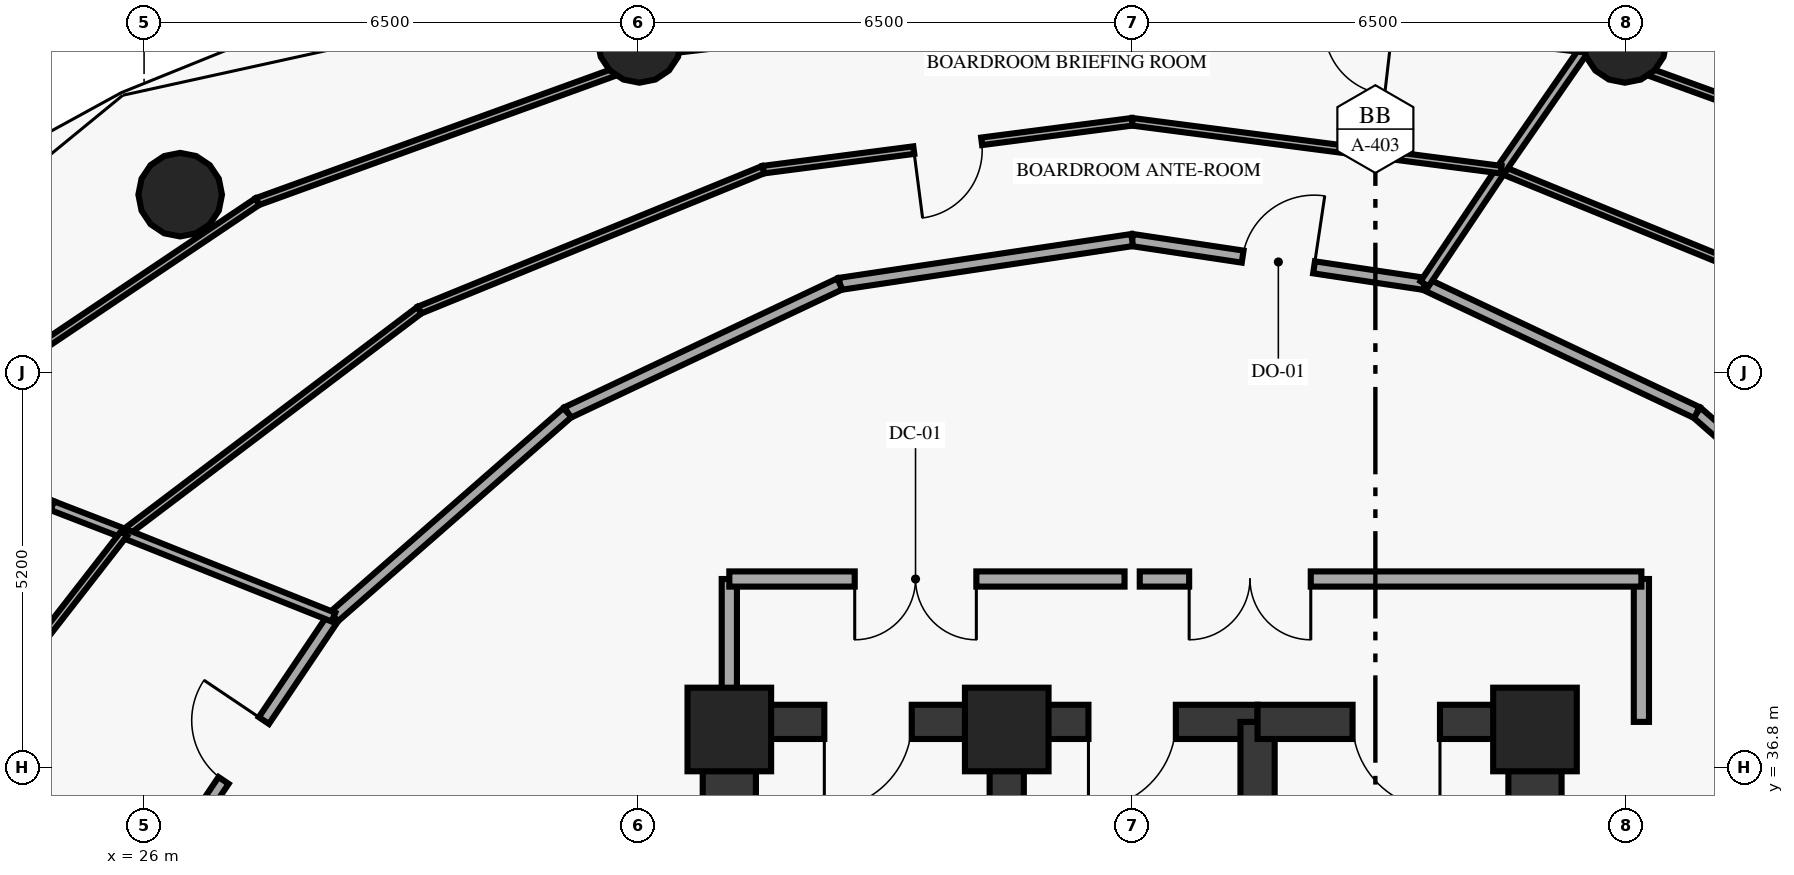
"""IFC4 building model, lengths in metres.
Left out: names, types, materials, properties, quantities, classifications, styles, units other than length and angle.
Written with IfcOpenShell. Run it as: python <this file> out.ifc"""

import sys

from ifc_helpers import new_model, si_unit, direction, frame, frame_2d, origin, origin_2d, place, context, subcontext, project, spatial, rectangle, circle, extrude, element, fill, save


model = new_model("IFC4")
c1 = context("Model", 3, precision=1e-05, world=origin(), true_north=direction((0.0, 1.0)))
c2 = subcontext(c1, "Body", "Model", "MODEL_VIEW")
j1 = project(units=[si_unit("LENGTHUNIT", "METRE"), si_unit("PLANEANGLEUNIT", "RADIAN")], contexts=[c1])
p1 = place(None, origin())
s1 = spatial("IfcSite", under=j1, at=p1, CompositionType="ELEMENT")
p2 = place(p1, origin())
s2 = spatial("IfcBuilding", under=s1, at=p2, CompositionType="ELEMENT")
p3 = place(p2, frame((0.0, 0.0, 102.0)))
s3 = spatial("IfcBuildingStorey", under=s2, at=p3, CompositionType="ELEMENT", Elevation=102.0)
for number, where, z_axis, x_axis in (
    (1, (44.3, 37.3, 0.0), (0.0, 0.0, 1.0), (1.0, 0.0, 0.0)),
    (2, (37.35, 37.3, 0.0), (0.0, 0.0, 1.0), (1.0, 0.0, 0.0)),
    (3, (33.7, 37.3, 0.0), (0.0, 0.0, 1.0), (1.0, 0.0, 0.0)),
):
    element("IfcColumn", number, at=place(p3, frame(where, z_axis=z_axis, x_axis=x_axis)), inside=s3, PredefinedType="PILASTER", context=c2, shape_type="SweptSolid", body=[
        extrude(rectangle(XDim=1.1, YDim=1.1, at=origin_2d()), origin(), (0.0, 0.0, 1.0), 3.7),
    ])
for number, where, z_axis, x_axis in (
    (4, (45.483, 46.36, 0.0), (0.0, 0.0, 1.0), (1.0, 0.0, 0.0)),
    (5, (32.517, 46.36, 0.0), (0.0, 0.0, 1.0), (1.0, 0.0, 0.0)),
    (6, (26.475, 44.337, 0.0), (0.0, 0.0, 1.0), (1.0, 0.0, 0.0)),
):
    element("IfcColumn", number, at=place(p3, frame(where, z_axis=z_axis, x_axis=x_axis)), inside=s3, PredefinedType="COLUMN", context=c2, shape_type="SweptSolid", body=[
        extrude(circle(Radius=0.55, at=origin_2d()), origin(), (0.0, 0.0, 1.0), 3.7),
    ])
for number, where, z_axis, x_axis in (
    (7, (33.7, 29.05, 0.0), (0.0, 0.0, 1.0), (0.0, 1.0, 0.0)),
    (8, (44.3, 29.05, 0.0), (0.0, 0.0, 1.0), (0.0, 1.0, 0.0)),
):
    element("IfcWall", number, at=place(p3, frame(where, z_axis=z_axis, x_axis=x_axis)), inside=s3, PredefinedType="SHEAR", context=c2, shape_type="SweptSolid", body=[
        extrude(rectangle(XDim=8.35, YDim=0.7, at=frame_2d((4.175, 0.0))), origin(), (0.0, 0.0, 1.0), 3.7),
    ])
p4 = place(p3, frame((37.35, 37.4, 0.0), z_axis=(0.0, 0.0, 1.0), x_axis=(-1.0, 0.0, 0.0)))
e9 = element("IfcWall", 9, at=p4, inside=s3, PredefinedType="SHEAR", context=c2, shape_type="SweptSolid", body=[
    extrude(rectangle(XDim=3.65, YDim=0.45, at=frame_2d((1.825, 0.0))), origin(), (0.0, 0.0, 1.0), 3.7),
])
p5 = place(p4, frame((1.25, 0.0, 0.0)))
e10 = element("IfcOpeningElement", 10, at=p5, cuts=e9, PredefinedType="OPENING", context=c2, shape_type="SweptSolid", body=[
    extrude(rectangle(XDim=1.15, YDim=2.15, at=frame_2d((0.575, 1.075))), frame((0.0, 0.235, 0.0), z_axis=(0.0, -1.0, 0.0), x_axis=(1.0, 0.0, 0.0)), (0.0, 0.0, 1.0), 0.47),
])
p6 = place(p3, frame((37.35, 29.05, 0.0), z_axis=(0.0, 0.0, 1.0), x_axis=(0.0, 1.0, 0.0)))
e11 = element("IfcWall", 11, at=p6, inside=s3, PredefinedType="SHEAR", context=c2, shape_type="SweptSolid", body=[
    extrude(rectangle(XDim=8.35, YDim=0.45, at=frame_2d((4.175, 0.0))), origin(), (0.0, 0.0, 1.0), 3.7),
])
p7 = place(p3, frame((40.65, 37.4, 0.0), z_axis=(0.0, 0.0, 1.0), x_axis=(-1.0, 0.0, 0.0)))
e12 = element("IfcWall", 12, at=p7, inside=s3, PredefinedType="SHEAR", context=c2, shape_type="SweptSolid", body=[
    extrude(rectangle(XDim=3.3, YDim=0.45, at=frame_2d((1.65, 0.0))), origin(), (0.0, 0.0, 1.0), 3.7),
])
p8 = place(p7, frame((1.075, 0.0, 0.0)))
e13 = element("IfcOpeningElement", 13, at=p8, cuts=e12, PredefinedType="OPENING", context=c2, shape_type="SweptSolid", body=[
    extrude(rectangle(XDim=1.15, YDim=2.15, at=frame_2d((0.575, 1.075))), frame((0.0, 0.235, 0.0), z_axis=(0.0, -1.0, 0.0), x_axis=(1.0, 0.0, 0.0)), (0.0, 0.0, 1.0), 0.47),
])
p9 = place(p3, frame((40.65, 29.05, 0.0), z_axis=(0.0, 0.0, 1.0), x_axis=(0.0, 1.0, 0.0)))
e14 = element("IfcWall", 14, at=p9, inside=s3, PredefinedType="SHEAR", context=c2, shape_type="SweptSolid", body=[
    extrude(rectangle(XDim=8.35, YDim=0.45, at=frame_2d((4.175, 0.0))), origin(), (0.0, 0.0, 1.0), 3.7),
])
p10 = place(p3, frame((44.3, 37.4, 0.0), z_axis=(0.0, 0.0, 1.0), x_axis=(-1.0, 0.0, 0.0)))
e15 = element("IfcWall", 15, at=p10, inside=s3, PredefinedType="SHEAR", context=c2, shape_type="SweptSolid", body=[
    extrude(rectangle(XDim=3.65, YDim=0.45, at=frame_2d((1.825, 0.0))), origin(), (0.0, 0.0, 1.0), 3.7),
])
p11 = place(p10, frame((1.25, 0.0, 0.0)))
e16 = element("IfcOpeningElement", 16, at=p11, cuts=e15, PredefinedType="OPENING", context=c2, shape_type="SweptSolid", body=[
    extrude(rectangle(XDim=1.15, YDim=2.15, at=frame_2d((0.575, 1.075))), frame((0.0, 0.235, 0.0), z_axis=(0.0, -1.0, 0.0), x_axis=(1.0, 0.0, 0.0)), (0.0, 0.0, 1.0), 0.47),
])
for number, where, z_axis, x_axis in (
    (17, (33.7, 37.4, 0.0), (0.0, 0.0, 1.0), (0.0, 1.0, 0.0)),
    (18, (45.7, 37.4, 0.0), (0.0, 0.0, 1.0), (0.0, 1.0, 0.0)),
):
    element("IfcWall", number, at=place(p3, frame(where, z_axis=z_axis, x_axis=x_axis)), inside=s3, PredefinedType="SOLIDWALL", context=c2, shape_type="SweptSolid", body=[
        extrude(rectangle(XDim=1.88, YDim=0.2, at=frame_2d((0.94, 0.0))), origin(), (0.0, 0.0, 1.0), 3.7),
    ])
p12 = place(p3, frame((38.9, 39.28, 0.0), z_axis=(0.0, 0.0, 1.0), x_axis=(-1.0, 0.0, 0.0)))
e19 = element("IfcWall", 19, at=p12, inside=s3, PredefinedType="SOLIDWALL", context=c2, shape_type="SweptSolid", body=[
    extrude(rectangle(XDim=5.2, YDim=0.2, at=frame_2d((2.6, 0.0))), origin(), (0.0, 0.0, 1.0), 3.7),
])
p13 = place(p12, frame((1.95, 0.0, 0.0)))
e20 = element("IfcOpeningElement", 20, at=p13, cuts=e19, PredefinedType="OPENING", context=c2, shape_type="SweptSolid", body=[
    extrude(rectangle(XDim=1.6, YDim=2.2, at=frame_2d((0.8, 1.1))), frame((0.0, 0.11, 0.0), z_axis=(0.0, -1.0, 0.0), x_axis=(1.0, 0.0, 0.0)), (0.0, 0.0, 1.0), 0.22),
])
p14 = place(p3, frame((45.7, 39.28, 0.0), z_axis=(0.0, 0.0, 1.0), x_axis=(-1.0, 0.0, 0.0)))
e21 = element("IfcWall", 21, at=p14, inside=s3, PredefinedType="SOLIDWALL", context=c2, shape_type="SweptSolid", body=[
    extrude(rectangle(XDim=6.6, YDim=0.2, at=frame_2d((3.3, 0.0))), origin(), (0.0, 0.0, 1.0), 3.7),
])
p15 = place(p14, frame((4.35, 0.0, 0.0)))
e22 = element("IfcOpeningElement", 22, at=p15, cuts=e21, PredefinedType="OPENING", context=c2, shape_type="SweptSolid", body=[
    extrude(rectangle(XDim=1.6, YDim=2.2, at=frame_2d((0.8, 1.1))), frame((0.0, 0.11, 0.0), z_axis=(0.0, -1.0, 0.0), x_axis=(1.0, 0.0, 0.0)), (0.0, 0.0, 1.0), 0.22),
])
p16 = place(p3, frame((49.508, 38.778, 0.0), z_axis=(0.0, 0.0, 1.0), x_axis=(-0.75275419575, 0.658301694348, 0.0)))
e23 = element("IfcWall", 23, at=p16, inside=s3, PredefinedType="PARTITIONING", context=c2, shape_type="SweptSolid", body=[
    extrude(rectangle(XDim=4.089, YDim=0.16, at=frame_2d((2.044, 0.0))), origin(), (0.0, 0.0, 1.0), 3.7),
])
p17 = place(p3, frame((46.43, 41.47, 0.0), z_axis=(0.0, 0.0, 1.0), x_axis=(-0.904182574226, 0.427146195658, 0.0)))
e24 = element("IfcWall", 24, at=p17, inside=s3, PredefinedType="PARTITIONING", context=c2, shape_type="SweptSolid", body=[
    extrude(rectangle(XDim=3.964, YDim=0.16, at=frame_2d((1.982, 0.0))), origin(), (0.0, 0.0, 1.0), 3.7),
])
p18 = place(p3, frame((39.0, 43.74, 0.0), z_axis=(0.0, 0.0, 1.0), x_axis=(0.988935892392, -0.14834352274, 0.0)))
e25 = element("IfcWall", 25, at=p18, inside=s3, PredefinedType="PARTITIONING", context=c2, shape_type="SweptSolid", body=[
    extrude(rectangle(XDim=3.889, YDim=0.16, at=frame_2d((1.944, 0.0))), origin(), (0.0, 0.0, 1.0), 3.7),
])
p19 = place(p18, frame((1.47, 0.0, 0.0)))
e26 = element("IfcOpeningElement", 26, at=p19, cuts=e25, PredefinedType="OPENING", context=c2, shape_type="SweptSolid", body=[
    extrude(rectangle(XDim=0.95, YDim=2.15, at=frame_2d((0.475, 1.075))), frame((0.0, 0.09, 0.0), z_axis=(0.0, -1.0, 0.0), x_axis=(1.0, 0.0, 0.0)), (0.0, 0.0, 1.0), 0.18),
])
p20 = place(p3, frame((39.0, 43.74, 0.0), z_axis=(0.0, 0.0, 1.0), x_axis=(-0.988935892392, -0.14834352274, 0.0)))
e27 = element("IfcWall", 27, at=p20, inside=s3, PredefinedType="PARTITIONING", context=c2, shape_type="SweptSolid", body=[
    extrude(rectangle(XDim=3.889, YDim=0.16, at=frame_2d((1.944, 0.0))), origin(), (0.0, 0.0, 1.0), 3.7),
])
p21 = place(p3, frame((35.154, 43.163, 0.0), z_axis=(0.0, 0.0, 1.0), x_axis=(-0.904182574226, -0.427146195658, 0.0)))
e28 = element("IfcWall", 28, at=p21, inside=s3, PredefinedType="PARTITIONING", context=c2, shape_type="SweptSolid", body=[
    extrude(rectangle(XDim=3.964, YDim=0.16, at=frame_2d((1.982, 0.0))), origin(), (0.0, 0.0, 1.0), 3.7),
])
p22 = place(p3, frame((31.57, 41.47, 0.0), z_axis=(0.0, 0.0, 1.0), x_axis=(-0.75275419575, -0.658301694348, 0.0)))
e29 = element("IfcWall", 29, at=p22, inside=s3, PredefinedType="PARTITIONING", context=c2, shape_type="SweptSolid", body=[
    extrude(rectangle(XDim=4.089, YDim=0.16, at=frame_2d((2.044, 0.0))), origin(), (0.0, 0.0, 1.0), 3.7),
])
p23 = place(p3, frame((26.131, 35.27, 0.0), z_axis=(0.0, 0.0, 1.0), x_axis=(0.558319056182, 0.829626320402, 0.0)))
e30 = element("IfcWall", 30, at=p23, inside=s3, PredefinedType="PARTITIONING", context=c2, shape_type="SweptSolid", body=[
    extrude(rectangle(XDim=4.229, YDim=0.16, at=frame_2d((2.114, 0.0))), origin(), (0.0, 0.0, 1.0), 3.7),
])
p24 = place(p23, frame((1.639, 0.0, 0.0)))
e31 = element("IfcOpeningElement", 31, at=p24, cuts=e30, PredefinedType="OPENING", context=c2, shape_type="SweptSolid", body=[
    extrude(rectangle(XDim=0.95, YDim=2.15, at=frame_2d((0.475, 1.075))), frame((0.0, 0.09, 0.0), z_axis=(0.0, -1.0, 0.0), x_axis=(1.0, 0.0, 0.0)), (0.0, 0.0, 1.0), 0.18),
])
p25 = place(p3, frame((48.377, 42.818, 0.0), z_axis=(0.0, 0.0, 1.0), x_axis=(-0.925718788243, 0.378212539577, 0.0)))
e32 = element("IfcWall", 32, at=p25, inside=s3, PredefinedType="MOVABLE", context=c2, shape_type="SweptSolid", body=[
    extrude(rectangle(XDim=4.886, YDim=0.1, at=frame_2d((2.443, 0.0))), origin(), (0.0, 0.0, 1.0), 3.7),
])
p26 = place(p3, frame((50.509, 44.246, 0.0), z_axis=(0.0, 0.0, 1.0), x_axis=(-0.940117685929, 0.340850020689, 0.0)))
e33 = element("IfcWall", 33, at=p26, inside=s3, PredefinedType="MOVABLE", context=c2, shape_type="SweptSolid", body=[
    extrude(rectangle(XDim=5.906, YDim=0.1, at=frame_2d((2.953, 0.0))), origin(), (0.0, 0.0, 1.0), 3.7),
])
p27 = place(p3, frame((42.846, 43.163, 0.0), z_axis=(0.0, 0.0, 1.0), x_axis=(0.557032949089, 0.83049039346, 0.0)))
e34 = element("IfcWall", 34, at=p27, inside=s3, PredefinedType="PARTITIONING", context=c2, shape_type="SweptSolid", body=[
    extrude(rectangle(XDim=1.81, YDim=0.125, at=frame_2d((0.905, 0.0))), origin(), (0.0, 0.0, 1.0), 3.7),
])
p28 = place(p3, frame((43.854, 44.666, 0.0), z_axis=(0.0, 0.0, 1.0), x_axis=(0.569268945464, 0.822151365461, 0.0)))
e35 = element("IfcWall", 35, at=p28, inside=s3, PredefinedType="PARTITIONING", context=c2, shape_type="SweptSolid", body=[
    extrude(rectangle(XDim=1.938, YDim=0.125, at=frame_2d((0.969, 0.0))), origin(), (0.0, 0.0, 1.0), 3.7),
])
p29 = place(p3, frame((43.854, 44.666, 0.0), z_axis=(0.0, 0.0, 1.0), x_axis=(-0.991685305255, 0.128686655646, 0.0)))
e36 = element("IfcWall", 36, at=p29, inside=s3, PredefinedType="MOVABLE", context=c2, shape_type="SweptSolid", body=[
    extrude(rectangle(XDim=4.895, YDim=0.1, at=frame_2d((2.447, 0.0))), origin(), (0.0, 0.0, 1.0), 3.7),
])
p30 = place(p3, frame((39.0, 45.296, 0.0), z_axis=(0.0, 0.0, 1.0), x_axis=(-0.991685305255, -0.128686655646, 0.0)))
e37 = element("IfcWall", 37, at=p30, inside=s3, PredefinedType="MOVABLE", context=c2, shape_type="SweptSolid", body=[
    extrude(rectangle(XDim=4.895, YDim=0.1, at=frame_2d((2.447, 0.0))), origin(), (0.0, 0.0, 1.0), 3.7),
])
p31 = place(p30, frame((1.997, 0.0, 0.0)))
e38 = element("IfcOpeningElement", 38, at=p31, cuts=e37, PredefinedType="OPENING", context=c2, shape_type="SweptSolid", body=[
    extrude(rectangle(XDim=0.9, YDim=2.1, at=frame_2d((0.45, 1.05))), frame((0.0, 0.06, 0.0), z_axis=(0.0, -1.0, 0.0), x_axis=(1.0, 0.0, 0.0)), (0.0, 0.0, 1.0), 0.12),
])
p32 = place(p3, frame((34.146, 44.666, 0.0), z_axis=(0.0, 0.0, 1.0), x_axis=(-0.925718788243, -0.378212539577, 0.0)))
e39 = element("IfcWall", 39, at=p32, inside=s3, PredefinedType="MOVABLE", context=c2, shape_type="SweptSolid", body=[
    extrude(rectangle(XDim=4.886, YDim=0.1, at=frame_2d((2.443, 0.0))), origin(), (0.0, 0.0, 1.0), 3.7),
])
p33 = place(p3, frame((29.623, 42.818, 0.0), z_axis=(0.0, 0.0, 1.0), x_axis=(-0.797485241188, -0.60333845401, 0.0)))
e40 = element("IfcWall", 40, at=p33, inside=s3, PredefinedType="MOVABLE", context=c2, shape_type="SweptSolid", body=[
    extrude(rectangle(XDim=4.872, YDim=0.1, at=frame_2d((2.436, 0.0))), origin(), (0.0, 0.0, 1.0), 3.7),
])
p34 = place(p3, frame((44.957, 46.259, 0.0), z_axis=(0.0, 0.0, 1.0), x_axis=(-0.993433875949, 0.114407753747, 0.0)))
e41 = element("IfcWall", 41, at=p34, inside=s3, PredefinedType="MOVABLE", context=c2, shape_type="SweptSolid", body=[
    extrude(rectangle(XDim=5.996, YDim=0.1, at=frame_2d((2.998, 0.0))), origin(), (0.0, 0.0, 1.0), 3.005),
])
p35 = place(p34, frame((2.548, 0.0, 0.0)))
e42 = element("IfcOpeningElement", 42, at=p35, cuts=e41, PredefinedType="OPENING", context=c2, shape_type="SweptSolid", body=[
    extrude(rectangle(XDim=0.9, YDim=2.1, at=frame_2d((0.45, 1.05))), frame((0.0, 0.06, 0.0), z_axis=(0.0, -1.0, 0.0), x_axis=(1.0, 0.0, 0.0)), (0.0, 0.0, 1.0), 0.12),
])
p36 = place(p3, frame((39.0, 46.945, 0.0), z_axis=(0.0, 0.0, 1.0), x_axis=(-0.993433875949, -0.114407753747, 0.0)))
e43 = element("IfcWall", 43, at=p36, inside=s3, PredefinedType="MOVABLE", context=c2, shape_type="SweptSolid", body=[
    extrude(rectangle(XDim=5.996, YDim=0.1, at=frame_2d((2.998, 0.0))), origin(), (0.0, 0.0, 1.0), 3.005),
])
p37 = place(p3, frame((33.043, 46.259, 0.0), z_axis=(0.0, 0.0, 1.0), x_axis=(-0.940117685929, -0.340850020689, 0.0)))
e44 = element("IfcWall", 44, at=p37, inside=s3, PredefinedType="MOVABLE", context=c2, shape_type="SweptSolid", body=[
    extrude(rectangle(XDim=5.906, YDim=0.1, at=frame_2d((2.953, 0.0))), origin(), (0.0, 0.0, 1.0), 3.7),
])
p38 = place(p3, frame((27.491, 44.246, 0.0), z_axis=(0.0, 0.0, 1.0), x_axis=(-0.830174745772, -0.557503265893, 0.0)))
e45 = element("IfcWall", 45, at=p38, inside=s3, PredefinedType="MOVABLE", context=c2, shape_type="SweptSolid", body=[
    extrude(rectangle(XDim=5.742, YDim=0.1, at=frame_2d((2.871, 0.0))), origin(), (0.0, 0.0, 1.0), 3.7),
])
p39 = place(p3, frame((28.492, 38.778, 0.0), z_axis=(0.0, 0.0, 1.0), x_axis=(-0.928561824385, 0.371177771822, 0.0)))
e46 = element("IfcWall", 46, at=p39, inside=s3, PredefinedType="PARTITIONING", context=c2, shape_type="SweptSolid", body=[
    extrude(rectangle(XDim=2.966, YDim=0.125, at=frame_2d((1.483, 0.0))), origin(), (0.0, 0.0, 1.0), 2.92),
])
p40 = place(p3, frame((25.738, 39.879, 0.0), z_axis=(0.0, 0.0, 1.0), x_axis=(-0.932693379072, 0.360670293531, 0.0)))
e47 = element("IfcWall", 47, at=p40, inside=s3, PredefinedType="PARTITIONING", context=c2, shape_type="SweptSolid", body=[
    extrude(rectangle(XDim=1.015, YDim=0.125, at=frame_2d((0.508, 0.0))), origin(), (0.0, 0.0, 1.0), 2.92),
])
p41 = place(p3, frame((24.791, 40.245, 0.0), z_axis=(0.0, 0.0, 1.0), x_axis=(-0.932611158557, 0.360882843779, 0.0)))
e48 = element("IfcWall", 48, at=p41, inside=s3, PredefinedType="PARTITIONING", context=c2, shape_type="SweptSolid", body=[
    extrude(rectangle(XDim=2.216, YDim=0.125, at=frame_2d((1.108, 0.0))), origin(), (0.0, 0.0, 1.0), 3.7),
])
p42 = place(p3, frame((25.738, 39.879, 0.0), z_axis=(0.0, 0.0, 1.0), x_axis=(-0.613999814684, -0.789306168459, 0.0)))
e49 = element("IfcWall", 49, at=p42, inside=s3, PredefinedType="MOVABLE", context=c2, shape_type="SweptSolid", body=[
    extrude(rectangle(XDim=4.853, YDim=0.1, at=frame_2d((2.427, 0.0))), origin(), (0.0, 0.0, 1.0), 3.7),
])
p43 = place(p5, origin())
e50 = element("IfcDoor", 50, at=p43, inside=s3, OperationType="SINGLE_SWING_RIGHT", PredefinedType="DOOR", context=c2, shape_type="SweptSolid", body=[
    extrude(rectangle(XDim=1.15, YDim=2.15, at=frame_2d((0.575, 1.075))), frame((0.0, 0.025, 0.0), z_axis=(0.0, -1.0, 0.0), x_axis=(1.0, 0.0, 0.0)), (0.0, 0.0, 1.0), 0.05),
])
fill(e10, e50)
p44 = place(p8, origin())
e51 = element("IfcDoor", 51, at=p44, inside=s3, OperationType="SINGLE_SWING_RIGHT", PredefinedType="DOOR", context=c2, shape_type="SweptSolid", body=[
    extrude(rectangle(XDim=1.15, YDim=2.15, at=frame_2d((0.575, 1.075))), frame((0.0, 0.025, 0.0), z_axis=(0.0, -1.0, 0.0), x_axis=(1.0, 0.0, 0.0)), (0.0, 0.0, 1.0), 0.05),
])
fill(e13, e51)
p45 = place(p11, origin())
e52 = element("IfcDoor", 52, at=p45, inside=s3, OperationType="SINGLE_SWING_LEFT", PredefinedType="DOOR", context=c2, shape_type="SweptSolid", body=[
    extrude(rectangle(XDim=1.15, YDim=2.15, at=frame_2d((0.575, 1.075))), frame((0.0, 0.025, 0.0), z_axis=(0.0, -1.0, 0.0), x_axis=(1.0, 0.0, 0.0)), (0.0, 0.0, 1.0), 0.05),
])
fill(e16, e52)
p46 = place(p13, origin())
e53 = element("IfcDoor", 53, at=p46, inside=s3, OperationType="DOUBLE_DOOR_SINGLE_SWING", PredefinedType="DOOR", context=c2, shape_type="SweptSolid", body=[
    extrude(rectangle(XDim=1.6, YDim=2.2, at=frame_2d((0.8, 1.1))), frame((0.0, 0.025, 0.0), z_axis=(0.0, -1.0, 0.0), x_axis=(1.0, 0.0, 0.0)), (0.0, 0.0, 1.0), 0.05),
])
fill(e20, e53)
p47 = place(p15, origin())
e54 = element("IfcDoor", 54, at=p47, inside=s3, OperationType="DOUBLE_DOOR_SINGLE_SWING", PredefinedType="DOOR", context=c2, shape_type="SweptSolid", body=[
    extrude(rectangle(XDim=1.6, YDim=2.2, at=frame_2d((0.8, 1.1))), frame((0.0, 0.025, 0.0), z_axis=(0.0, -1.0, 0.0), x_axis=(1.0, 0.0, 0.0)), (0.0, 0.0, 1.0), 0.05),
])
fill(e22, e54)
p48 = place(p19, origin())
e55 = element("IfcDoor", 55, at=p48, inside=s3, OperationType="SINGLE_SWING_RIGHT", PredefinedType="DOOR", context=c2, shape_type="SweptSolid", body=[
    extrude(rectangle(XDim=0.95, YDim=2.15, at=frame_2d((0.475, 1.075))), frame((0.0, 0.025, 0.0), z_axis=(0.0, -1.0, 0.0), x_axis=(1.0, 0.0, 0.0)), (0.0, 0.0, 1.0), 0.05),
])
fill(e26, e55)
p49 = place(p24, origin())
e56 = element("IfcDoor", 56, at=p49, inside=s3, OperationType="SINGLE_SWING_RIGHT", PredefinedType="DOOR", context=c2, shape_type="SweptSolid", body=[
    extrude(rectangle(XDim=0.95, YDim=2.15, at=frame_2d((0.475, 1.075))), frame((0.0, 0.025, 0.0), z_axis=(0.0, -1.0, 0.0), x_axis=(1.0, 0.0, 0.0)), (0.0, 0.0, 1.0), 0.05),
])
fill(e31, e56)
p50 = place(p31, origin())
e57 = element("IfcDoor", 57, at=p50, inside=s3, OperationType="SINGLE_SWING_RIGHT", PredefinedType="DOOR", context=c2, shape_type="SweptSolid", body=[
    extrude(rectangle(XDim=0.9, YDim=2.1, at=frame_2d((0.45, 1.05))), frame((0.0, 0.025, 0.0), z_axis=(0.0, -1.0, 0.0), x_axis=(1.0, 0.0, 0.0)), (0.0, 0.0, 1.0), 0.05),
])
fill(e38, e57)
save(model, sys.argv[1])
